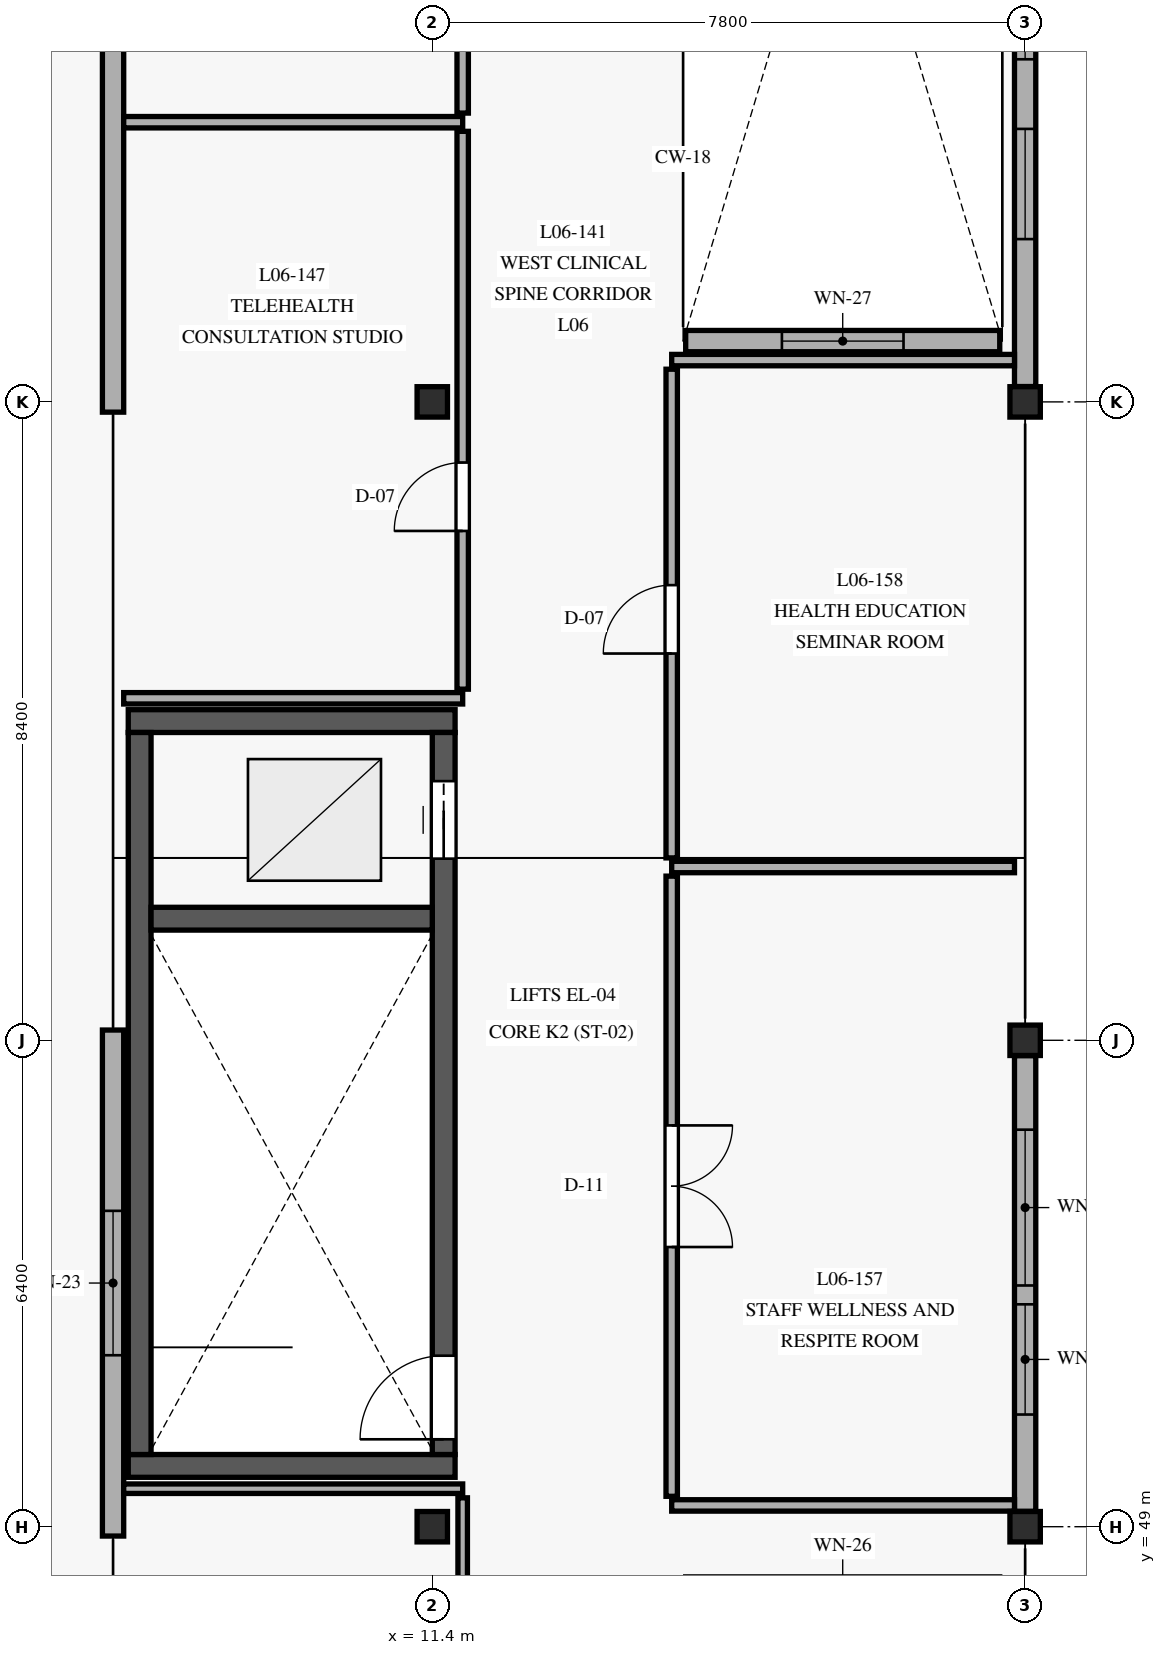
"""IFC4 building model, lengths in metres.
Left out: names, types, materials, properties, quantities, classifications, styles, units other than length and angle.
Written with IfcOpenShell. Run it as: python <this file> out.ifc"""

import sys

from ifc_helpers import new_model, si_unit, direction, frame, frame_2d, origin, origin_with_axes, origin_2d, place, context, subcontext, project, spatial, rectangle, extrude, element, fill, save


model = new_model("IFC4")
c1 = context("Model", 3, precision=1e-05, world=origin(), true_north=direction((0.0, 1.0)))
c2 = subcontext(c1, "Body", "Model", "MODEL_VIEW")
j1 = project(units=[si_unit("LENGTHUNIT", "METRE"), si_unit("PLANEANGLEUNIT", "RADIAN")], contexts=[c1])
p1 = place(None, origin())
s1 = spatial("IfcSite", under=j1, at=p1, CompositionType="ELEMENT")
p2 = place(p1, origin())
s2 = spatial("IfcBuilding", under=s1, at=p2, CompositionType="ELEMENT")
p3 = place(p2, frame((0.0, 0.0, 21.6)))
s3 = spatial("IfcBuildingStorey", under=s2, at=p3, CompositionType="ELEMENT", Elevation=21.6)
for number, where, z_axis, x_axis in (
    (1, (11.4, 49.0, 0.0), (0.0, 0.0, 1.0), (1.0, 0.0, 0.0)),
    (2, (11.4, 63.8, 0.0), (0.0, 0.0, 1.0), (1.0, 0.0, 0.0)),
    (3, (19.2, 49.0, 0.0), (0.0, 0.0, 1.0), (1.0, 0.0, 0.0)),
    (4, (19.2, 55.4, 0.0), (0.0, 0.0, 1.0), (1.0, 0.0, 0.0)),
    (5, (19.2, 63.8, 0.0), (0.0, 0.0, 1.0), (1.0, 0.0, 0.0)),
):
    element("IfcColumn", number, at=place(p3, frame(where, z_axis=z_axis, x_axis=x_axis)), inside=s3, PredefinedType="COLUMN", context=c2, shape_type="SweptSolid", body=[
        extrude(rectangle(XDim=0.4, YDim=0.4, at=origin_2d()), origin(), (0.0, 0.0, 1.0), 4.05),
    ])
for number, where, z_axis, x_axis in (
    (6, (7.4, 49.8, 0.0), (0.0, 0.0, 1.0), (1.0, 0.0, 0.0)),
    (7, (11.7, 59.6, 0.0), (0.0, 0.0, 1.0), (-1.0, 0.0, 0.0)),
):
    element("IfcWall", number, at=place(p3, frame(where, z_axis=z_axis, x_axis=x_axis)), inside=s3, PredefinedType="SHEAR", context=c2, shape_type="SweptSolid", body=[
        extrude(rectangle(XDim=4.3, YDim=0.3, at=frame_2d((2.15, 0.0))), origin(), (0.0, 0.0, 1.0), 3.84),
    ])
p4 = place(p3, frame((7.55, 59.45, 0.0), z_axis=(0.0, 0.0, 1.0), x_axis=(0.0, -1.0, 0.0)))
e8 = element("IfcWall", 8, at=p4, inside=s3, PredefinedType="SHEAR", context=c2, shape_type="SweptSolid", body=[
    extrude(rectangle(XDim=9.5, YDim=0.3, at=frame_2d((4.75, 0.0))), origin(), (0.0, 0.0, 1.0), 3.84),
])
p5 = place(p3, frame((11.55, 49.95, 0.0), z_axis=(0.0, 0.0, 1.0), x_axis=(0.0, 1.0, 0.0)))
e9 = element("IfcWall", 9, at=p5, inside=s3, PredefinedType="SHEAR", context=c2, shape_type="SweptSolid", body=[
    extrude(rectangle(XDim=9.5, YDim=0.3, at=frame_2d((4.75, 0.0))), origin(), (0.0, 0.0, 1.0), 3.84),
])
p6 = place(p5, frame((0.2, 0.0, 0.0)))
e10 = element("IfcOpeningElement", 10, at=p6, cuts=e9, PredefinedType="OPENING", context=c2, shape_type="SweptSolid", body=[
    extrude(rectangle(XDim=1.1, YDim=2.2, at=frame_2d((0.55, 1.1))), frame((0.0, 0.16, 0.0), z_axis=(0.0, -1.0, 0.0), x_axis=(1.0, 0.0, 0.0)), (0.0, 0.0, 1.0), 0.32),
])
p7 = place(p5, frame((7.84, 0.0, 0.0)))
e11 = element("IfcOpeningElement", 11, at=p7, cuts=e9, PredefinedType="OPENING", context=c2, shape_type="SweptSolid", body=[
    extrude(rectangle(XDim=1.02, YDim=2.15, at=frame_2d((0.51, 1.075))), frame((0.0, 0.16, 0.0), z_axis=(0.0, -1.0, 0.0), x_axis=(1.0, 0.0, 0.0)), (0.0, 0.0, 1.0), 0.32),
])
p8 = place(p3, frame((7.7, 57.0, 0.0), z_axis=(0.0, 0.0, 1.0), x_axis=(1.0, 0.0, 0.0)))
e12 = element("IfcWall", 12, at=p8, inside=s3, PredefinedType="SHEAR", context=c2, shape_type="SweptSolid", body=[
    extrude(rectangle(XDim=3.7, YDim=0.3, at=frame_2d((1.85, 0.0))), origin(), (0.0, 0.0, 1.0), 3.84),
])
p9 = place(p3, frame((7.2, 55.535, 0.0), z_axis=(0.0, 0.0, 1.0), x_axis=(0.0, -1.0, 0.0)))
e13 = element("IfcWall", 13, at=p9, inside=s3, PredefinedType="SOLIDWALL", context=c2, shape_type="SweptSolid", body=[
    extrude(rectangle(XDim=6.658, YDim=0.28, at=frame_2d((3.329, 0.0))), origin(), (0.0, 0.0, 1.0), 3.84),
])
p10 = place(p9, frame((2.379, 0.0, 0.85)))
e14 = element("IfcOpeningElement", 14, at=p10, cuts=e13, PredefinedType="OPENING", context=c2, shape_type="SweptSolid", body=[
    extrude(rectangle(XDim=1.9, YDim=1.75, at=frame_2d((0.95, 0.875))), frame((0.0, 0.15, 0.0), z_axis=(0.0, -1.0, 0.0), x_axis=(1.0, 0.0, 0.0)), (0.0, 0.0, 1.0), 0.3),
])
p11 = place(p3, frame((7.2, 72.335, 0.0), z_axis=(0.0, 0.0, 1.0), x_axis=(0.0, -1.0, 0.0)))
e15 = element("IfcWall", 15, at=p11, inside=s3, PredefinedType="SOLIDWALL", context=c2, shape_type="SweptSolid", body=[
    extrude(rectangle(XDim=8.67, YDim=0.28, at=frame_2d((4.335, 0.0))), origin(), (0.0, 0.0, 1.0), 3.84),
])
p12 = place(p11, frame((1.49, 0.0, 0.85)))
e16 = element("IfcOpeningElement", 16, at=p12, cuts=e15, PredefinedType="OPENING", context=c2, shape_type="SweptSolid", body=[
    extrude(rectangle(XDim=1.9, YDim=1.75, at=frame_2d((0.95, 0.875))), frame((0.0, 0.15, 0.0), z_axis=(0.0, -1.0, 0.0), x_axis=(1.0, 0.0, 0.0)), (0.0, 0.0, 1.0), 0.3),
])
p13 = place(p3, frame((19.2, 49.202, 0.0), z_axis=(0.0, 0.0, 1.0), x_axis=(0.0, 1.0, 0.0)))
e17 = element("IfcWall", 17, at=p13, inside=s3, PredefinedType="SOLIDWALL", context=c2, shape_type="SweptSolid", body=[
    extrude(rectangle(XDim=5.996, YDim=0.28, at=frame_2d((2.998, 0.0))), origin(), (0.0, 0.0, 1.0), 3.46),
])
p14 = place(p13, frame((1.274, 0.0, 0.85)))
e18 = element("IfcOpeningElement", 18, at=p14, cuts=e17, PredefinedType="OPENING", context=c2, shape_type="SweptSolid", body=[
    extrude(rectangle(XDim=1.45, YDim=1.95, at=frame_2d((0.725, 0.975))), frame((0.0, 0.15, 0.0), z_axis=(0.0, -1.0, 0.0), x_axis=(1.0, 0.0, 0.0)), (0.0, 0.0, 1.0), 0.3),
])
p15 = place(p13, frame((2.972, 0.0, 0.85)))
e19 = element("IfcOpeningElement", 19, at=p15, cuts=e17, PredefinedType="OPENING", context=c2, shape_type="SweptSolid", body=[
    extrude(rectangle(XDim=2.05, YDim=1.95, at=frame_2d((1.025, 0.975))), frame((0.0, 0.15, 0.0), z_axis=(0.0, -1.0, 0.0), x_axis=(1.0, 0.0, 0.0)), (0.0, 0.0, 1.0), 0.3),
])
p16 = place(p3, frame((19.2, 64.002, 0.0), z_axis=(0.0, 0.0, 1.0), x_axis=(0.0, 1.0, 0.0)))
e20 = element("IfcWall", 20, at=p16, inside=s3, PredefinedType="SOLIDWALL", context=c2, shape_type="SweptSolid", body=[
    extrude(rectangle(XDim=7.996, YDim=0.28, at=frame_2d((3.998, 0.0))), origin(), (0.0, 0.0, 1.0), 3.46),
])
p17 = place(p16, frame((1.94, 0.0, 0.85)))
e21 = element("IfcOpeningElement", 21, at=p17, cuts=e20, PredefinedType="OPENING", context=c2, shape_type="SweptSolid", body=[
    extrude(rectangle(XDim=1.45, YDim=1.95, at=frame_2d((0.725, 0.975))), frame((0.0, 0.15, 0.0), z_axis=(0.0, -1.0, 0.0), x_axis=(1.0, 0.0, 0.0)), (0.0, 0.0, 1.0), 0.3),
])
p18 = place(p16, frame((4.306, 0.0, 0.85)))
e22 = element("IfcOpeningElement", 22, at=p18, cuts=e20, PredefinedType="OPENING", context=c2, shape_type="SweptSolid", body=[
    extrude(rectangle(XDim=2.05, YDim=1.95, at=frame_2d((1.025, 0.975))), frame((0.0, 0.15, 0.0), z_axis=(0.0, -1.0, 0.0), x_axis=(1.0, 0.0, 0.0)), (0.0, 0.0, 1.0), 0.3),
])
p19 = place(p3, frame((18.866, 64.6, 0.0), z_axis=(0.0, 0.0, 1.0), x_axis=(-1.0, 0.0, 0.0)))
e23 = element("IfcWall", 23, at=p19, inside=s3, PredefinedType="SOLIDWALL", context=c2, shape_type="SweptSolid", body=[
    extrude(rectangle(XDim=4.132, YDim=0.28, at=frame_2d((2.066, 0.0))), origin(), (0.0, 0.0, 1.0), 3.84),
])
p20 = place(p19, frame((1.266, 0.0, 0.85)))
e24 = element("IfcOpeningElement", 24, at=p20, cuts=e23, PredefinedType="OPENING", context=c2, shape_type="SweptSolid", body=[
    extrude(rectangle(XDim=1.6, YDim=1.8, at=frame_2d((0.8, 0.9))), frame((0.0, 0.15, 0.0), z_axis=(0.0, -1.0, 0.0), x_axis=(1.0, 0.0, 0.0)), (0.0, 0.0, 1.0), 0.3),
])
p21 = place(p3, frame((11.8, 41.03, 0.0), z_axis=(0.0, 0.0, 1.0), x_axis=(0.0, 1.0, 0.0)))
e25 = element("IfcWall", 25, at=p21, inside=s3, PredefinedType="PARTITIONING", context=c2, shape_type="SweptSolid", body=[
    extrude(rectangle(XDim=8.35, YDim=0.125, at=frame_2d((4.175, 0.0))), origin(), (0.0, 0.0, 1.0), 3.435),
])
p22 = place(p21, frame((3.741, 0.0, 0.0)))
e26 = element("IfcOpeningElement", 26, at=p22, cuts=e25, PredefinedType="OPENING", context=c2, shape_type="SweptSolid", body=[
    extrude(rectangle(XDim=1.02, YDim=2.18, at=frame_2d((0.51, 1.09))), frame((0.0, 0.073, 0.0), z_axis=(0.0, -1.0, 0.0), x_axis=(1.0, 0.0, 0.0)), (0.0, 0.0, 1.0), 0.145),
])
p23 = place(p3, frame((7.34, 49.5, 0.0), z_axis=(0.0, 0.0, 1.0), x_axis=(1.0, 0.0, 0.0)))
e27 = element("IfcWall", 27, at=p23, inside=s3, PredefinedType="PARTITIONING", context=c2, shape_type="SweptSolid", body=[
    extrude(rectangle(XDim=4.46, YDim=0.125, at=frame_2d((2.23, 0.0))), origin(), (0.0, 0.0, 1.0), 3.835),
])
p24 = place(p3, frame((11.8, 60.02, 0.0), z_axis=(0.0, 0.0, 1.0), x_axis=(0.0, 1.0, 0.0)))
e28 = element("IfcWall", 28, at=p24, inside=s3, PredefinedType="PARTITIONING", context=c2, shape_type="SweptSolid", body=[
    extrude(rectangle(XDim=7.34, YDim=0.15, at=frame_2d((3.67, 0.0))), origin(), (0.0, 0.0, 1.0), 3.435),
])
p25 = place(p24, frame((2.082, 0.0, 0.0)))
e29 = element("IfcOpeningElement", 29, at=p25, cuts=e28, PredefinedType="OPENING", context=c2, shape_type="SweptSolid", body=[
    extrude(rectangle(XDim=0.9, YDim=2.12, at=frame_2d((0.45, 1.06))), frame((0.0, 0.085, 0.0), z_axis=(0.0, -1.0, 0.0), x_axis=(1.0, 0.0, 0.0)), (0.0, 0.0, 1.0), 0.17),
])
p26 = place(p3, frame((7.34, 67.48, 0.0), z_axis=(0.0, 0.0, 1.0), x_axis=(1.0, 0.0, 0.0)))
e30 = element("IfcWall", 30, at=p26, inside=s3, PredefinedType="PARTITIONING", context=c2, shape_type="SweptSolid", body=[
    extrude(rectangle(XDim=4.46, YDim=0.15, at=frame_2d((2.23, 0.0))), origin(), (0.0, 0.0, 1.0), 3.455),
])
p27 = place(p3, frame((7.34, 59.9, 0.0), z_axis=(0.0, 0.0, 1.0), x_axis=(1.0, 0.0, 0.0)))
e31 = element("IfcWall", 31, at=p27, inside=s3, PredefinedType="PARTITIONING", context=c2, shape_type="SweptSolid", body=[
    extrude(rectangle(XDim=4.46, YDim=0.15, at=frame_2d((2.23, 0.0))), origin(), (0.0, 0.0, 1.0), 3.835),
])
p28 = place(p3, frame((11.8, 67.6, 0.0), z_axis=(0.0, 0.0, 1.0), x_axis=(0.0, 1.0, 0.0)))
e32 = element("IfcWall", 32, at=p28, inside=s3, PredefinedType="PARTITIONING", context=c2, shape_type="SweptSolid", body=[
    extrude(rectangle(XDim=8.53, YDim=0.15, at=frame_2d((4.265, 0.0))), origin(), (0.0, 0.0, 1.0), 3.835),
])
p29 = place(p28, frame((1.786, 0.0, 0.0)))
e33 = element("IfcOpeningElement", 33, at=p29, cuts=e32, PredefinedType="OPENING", context=c2, shape_type="SweptSolid", body=[
    extrude(rectangle(XDim=1.6, YDim=2.25, at=frame_2d((0.8, 1.125))), frame((0.0, 0.085, 0.0), z_axis=(0.0, -1.0, 0.0), x_axis=(1.0, 0.0, 0.0)), (0.0, 0.0, 1.0), 0.17),
])
p30 = place(p3, frame((14.55, 49.4, 0.0), z_axis=(0.0, 0.0, 1.0), x_axis=(0.0, 1.0, 0.0)))
e34 = element("IfcWall", 34, at=p30, inside=s3, PredefinedType="PARTITIONING", context=c2, shape_type="SweptSolid", body=[
    extrude(rectangle(XDim=8.16, YDim=0.15, at=frame_2d((4.08, 0.0))), origin(), (0.0, 0.0, 1.0), 3.435),
])
p31 = place(p30, frame((3.28, 0.0, 0.0)))
e35 = element("IfcOpeningElement", 35, at=p31, cuts=e34, PredefinedType="OPENING", context=c2, shape_type="SweptSolid", body=[
    extrude(rectangle(XDim=1.6, YDim=2.25, at=frame_2d((0.8, 1.125))), frame((0.0, 0.085, 0.0), z_axis=(0.0, -1.0, 0.0), x_axis=(1.0, 0.0, 0.0)), (0.0, 0.0, 1.0), 0.17),
])
p32 = place(p3, frame((14.55, 49.28, 0.0), z_axis=(0.0, 0.0, 1.0), x_axis=(1.0, 0.0, 0.0)))
e36 = element("IfcWall", 36, at=p32, inside=s3, PredefinedType="PARTITIONING", context=c2, shape_type="SweptSolid", body=[
    extrude(rectangle(XDim=4.51, YDim=0.15, at=frame_2d((2.255, 0.0))), origin(), (0.0, 0.0, 1.0), 3.435),
])
p33 = place(p3, frame((14.55, 57.68, 0.0), z_axis=(0.0, 0.0, 1.0), x_axis=(1.0, 0.0, 0.0)))
e37 = element("IfcWall", 37, at=p33, inside=s3, PredefinedType="PARTITIONING", context=c2, shape_type="SweptSolid", body=[
    extrude(rectangle(XDim=4.51, YDim=0.15, at=frame_2d((2.255, 0.0))), origin(), (0.0, 0.0, 1.0), 3.455),
])
p34 = place(p3, frame((14.55, 57.8, 0.0), z_axis=(0.0, 0.0, 1.0), x_axis=(0.0, 1.0, 0.0)))
e38 = element("IfcWall", 38, at=p34, inside=s3, PredefinedType="PARTITIONING", context=c2, shape_type="SweptSolid", body=[
    extrude(rectangle(XDim=6.43, YDim=0.15, at=frame_2d((3.215, 0.0))), origin(), (0.0, 0.0, 1.0), 3.435),
])
p35 = place(p34, frame((2.689, 0.0, 0.0)))
e39 = element("IfcOpeningElement", 39, at=p35, cuts=e38, PredefinedType="OPENING", context=c2, shape_type="SweptSolid", body=[
    extrude(rectangle(XDim=0.9, YDim=2.12, at=frame_2d((0.45, 1.06))), frame((0.0, 0.085, 0.0), z_axis=(0.0, -1.0, 0.0), x_axis=(1.0, 0.0, 0.0)), (0.0, 0.0, 1.0), 0.17),
])
p36 = place(p3, frame((14.55, 64.35, 0.0), z_axis=(0.0, 0.0, 1.0), x_axis=(1.0, 0.0, 0.0)))
e40 = element("IfcWall", 40, at=p36, inside=s3, PredefinedType="PARTITIONING", context=c2, shape_type="SweptSolid", body=[
    extrude(rectangle(XDim=4.51, YDim=0.15, at=frame_2d((2.255, 0.0))), origin(), (0.0, 0.0, 1.0), 3.455),
])
p37 = place(p6, origin_with_axes())
e41 = element("IfcDoor", 41, at=p37, inside=s3, OperationType="SINGLE_SWING_LEFT", PredefinedType="DOOR", context=c2, shape_type="SweptSolid", body=[
    extrude(rectangle(XDim=1.1, YDim=2.2, at=frame_2d((0.55, 1.1))), frame((0.0, 0.025, 0.0), z_axis=(0.0, -1.0, 0.0), x_axis=(1.0, 0.0, 0.0)), (0.0, 0.0, 1.0), 0.05),
])
fill(e10, e41)
p38 = place(p7, origin_with_axes())
e42 = element("IfcDoor", 42, at=p38, inside=s3, OperationType="SLIDING_TO_LEFT", PredefinedType="DOOR", context=c2, shape_type="SweptSolid", body=[
    extrude(rectangle(XDim=1.02, YDim=2.15, at=frame_2d((0.51, 1.075))), frame((0.0, 0.025, 0.0), z_axis=(0.0, -1.0, 0.0), x_axis=(1.0, 0.0, 0.0)), (0.0, 0.0, 1.0), 0.05),
])
fill(e11, e42)
p39 = place(p10, origin_with_axes())
e43 = element("IfcWindow", 43, at=p39, inside=s3, PartitioningType="SINGLE_PANEL", PredefinedType="WINDOW", context=c2, shape_type="SweptSolid", body=[
    extrude(rectangle(XDim=1.9, YDim=1.75, at=frame_2d((0.95, 0.875))), frame((0.0, 0.03, 0.0), z_axis=(0.0, -1.0, 0.0), x_axis=(1.0, 0.0, 0.0)), (0.0, 0.0, 1.0), 0.06),
])
fill(e14, e43)
p40 = place(p14, origin_with_axes())
e44 = element("IfcWindow", 44, at=p40, inside=s3, PartitioningType="SINGLE_PANEL", PredefinedType="WINDOW", context=c2, shape_type="SweptSolid", body=[
    extrude(rectangle(XDim=1.45, YDim=1.95, at=frame_2d((0.725, 0.975))), frame((0.0, 0.03, 0.0), z_axis=(0.0, -1.0, 0.0), x_axis=(1.0, 0.0, 0.0)), (0.0, 0.0, 1.0), 0.06),
])
fill(e18, e44)
p41 = place(p15, origin_with_axes())
e45 = element("IfcWindow", 45, at=p41, inside=s3, PartitioningType="SINGLE_PANEL", PredefinedType="WINDOW", context=c2, shape_type="SweptSolid", body=[
    extrude(rectangle(XDim=2.05, YDim=1.95, at=frame_2d((1.025, 0.975))), frame((0.0, 0.03, 0.0), z_axis=(0.0, -1.0, 0.0), x_axis=(1.0, 0.0, 0.0)), (0.0, 0.0, 1.0), 0.06),
])
fill(e19, e45)
p42 = place(p17, origin_with_axes())
e46 = element("IfcWindow", 46, at=p42, inside=s3, PartitioningType="SINGLE_PANEL", PredefinedType="WINDOW", context=c2, shape_type="SweptSolid", body=[
    extrude(rectangle(XDim=1.45, YDim=1.95, at=frame_2d((0.725, 0.975))), frame((0.0, 0.03, 0.0), z_axis=(0.0, -1.0, 0.0), x_axis=(1.0, 0.0, 0.0)), (0.0, 0.0, 1.0), 0.06),
])
fill(e21, e46)
p43 = place(p18, origin_with_axes())
e47 = element("IfcWindow", 47, at=p43, inside=s3, PartitioningType="SINGLE_PANEL", PredefinedType="WINDOW", context=c2, shape_type="SweptSolid", body=[
    extrude(rectangle(XDim=2.05, YDim=1.95, at=frame_2d((1.025, 0.975))), frame((0.0, 0.03, 0.0), z_axis=(0.0, -1.0, 0.0), x_axis=(1.0, 0.0, 0.0)), (0.0, 0.0, 1.0), 0.06),
])
fill(e22, e47)
p44 = place(p20, origin_with_axes())
e48 = element("IfcWindow", 48, at=p44, inside=s3, PartitioningType="SINGLE_PANEL", PredefinedType="WINDOW", context=c2, shape_type="SweptSolid", body=[
    extrude(rectangle(XDim=1.6, YDim=1.8, at=frame_2d((0.8, 0.9))), frame((0.0, 0.03, 0.0), z_axis=(0.0, -1.0, 0.0), x_axis=(1.0, 0.0, 0.0)), (0.0, 0.0, 1.0), 0.06),
])
fill(e24, e48)
p45 = place(p25, origin_with_axes())
e49 = element("IfcDoor", 49, at=p45, inside=s3, OperationType="SINGLE_SWING_LEFT", PredefinedType="DOOR", context=c2, shape_type="SweptSolid", body=[
    extrude(rectangle(XDim=0.9, YDim=2.12, at=frame_2d((0.45, 1.06))), frame((0.0, 0.025, 0.0), z_axis=(0.0, -1.0, 0.0), x_axis=(1.0, 0.0, 0.0)), (0.0, 0.0, 1.0), 0.05),
])
fill(e29, e49)
p46 = place(p31, frame((1.6, 0.0, 0.0), z_axis=(0.0, 0.0, 1.0), x_axis=(-1.0, 0.0, 0.0)))
e50 = element("IfcDoor", 50, at=p46, inside=s3, OperationType="DOUBLE_DOOR_SINGLE_SWING", PredefinedType="DOOR", context=c2, shape_type="SweptSolid", body=[
    extrude(rectangle(XDim=1.6, YDim=2.25, at=frame_2d((0.8, 1.125))), frame((0.0, 0.025, 0.0), z_axis=(0.0, -1.0, 0.0), x_axis=(1.0, 0.0, 0.0)), (0.0, 0.0, 1.0), 0.05),
])
fill(e35, e50)
p47 = place(p35, frame((0.9, 0.0, 0.0), z_axis=(0.0, 0.0, 1.0), x_axis=(-1.0, 0.0, 0.0)))
e51 = element("IfcDoor", 51, at=p47, inside=s3, OperationType="SINGLE_SWING_RIGHT", PredefinedType="DOOR", context=c2, shape_type="SweptSolid", body=[
    extrude(rectangle(XDim=0.9, YDim=2.12, at=frame_2d((0.45, 1.06))), frame((0.0, 0.025, 0.0), z_axis=(0.0, -1.0, 0.0), x_axis=(1.0, 0.0, 0.0)), (0.0, 0.0, 1.0), 0.05),
])
fill(e39, e51)
save(model, sys.argv[1])
